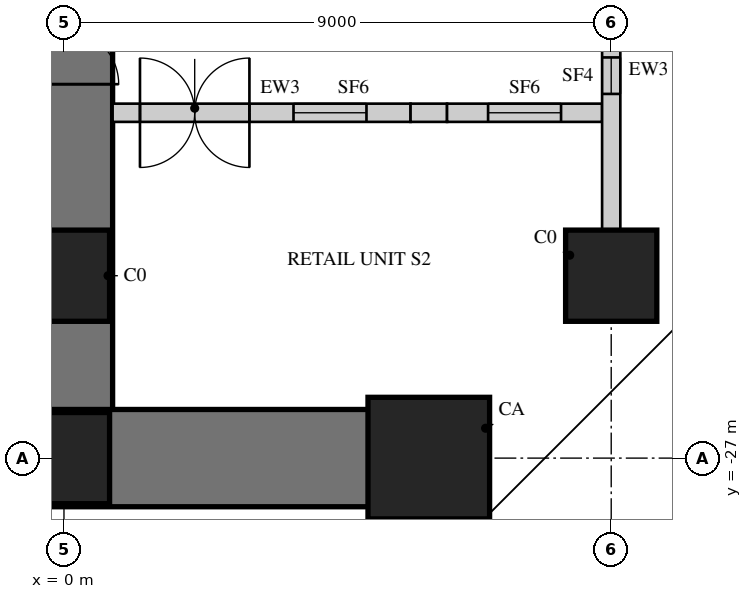
"""IFC4 building model, lengths in metres.
Left out: names, types, materials, properties, quantities, classifications, styles, units other than length and angle.
Written with IfcOpenShell. Run it as: python <this file> out.ifc"""

import sys

from ifc_helpers import new_model, si_unit, direction, frame, frame_2d, origin, origin_2d, place, context, subcontext, project, spatial, rectangle, hollow_rectangle, extrude, element, fill, save


model = new_model("IFC4")
c1 = context("Model", 3, precision=1e-05, world=origin(), true_north=direction((0.0, 1.0)))
c2 = subcontext(c1, "Body", "Model", "MODEL_VIEW")
j1 = project(units=[si_unit("LENGTHUNIT", "METRE"), si_unit("PLANEANGLEUNIT", "RADIAN")], contexts=[c1])
p1 = place(None, origin())
s1 = spatial("IfcSite", under=j1, at=p1, CompositionType="ELEMENT")
p2 = place(p1, origin())
s2 = spatial("IfcBuilding", under=s1, at=p2, CompositionType="ELEMENT")
p3 = place(p2, origin())
s3 = spatial("IfcBuildingStorey", under=s2, at=p3, CompositionType="ELEMENT", Elevation=0.0)
p4 = place(p3, frame((0.0, -9.0, 0.0), z_axis=(0.0, 0.0, 1.0), x_axis=(0.0, -1.0, 0.0)))
e1 = element("IfcWall", 1, at=p4, inside=s3, PredefinedType="SHEAR", context=c2, shape_type="SweptSolid", body=[
    extrude(rectangle(XDim=18.0, YDim=1.6, at=frame_2d((9.0, 0.0))), origin(), (0.0, 0.0, 1.0), 5.0),
])
p5 = place(p4, frame((10.05, 0.0, 0.0)))
e2 = element("IfcOpeningElement", 2, at=p5, cuts=e1, PredefinedType="OPENING", context=c2, shape_type="SweptSolid", body=[
    extrude(rectangle(XDim=1.8, YDim=2.4, at=frame_2d((0.9, 1.2))), frame((0.0, 0.81, 0.0), z_axis=(0.0, -1.0, 0.0), x_axis=(1.0, 0.0, 0.0)), (0.0, 0.0, 1.0), 1.62),
])
p6 = place(p3, frame((-6.0, -27.0, 0.0), z_axis=(0.0, 0.0, 1.0), x_axis=(1.0, 0.0, 0.0)))
e3 = element("IfcWall", 3, at=p6, inside=s3, PredefinedType="SHEAR", context=c2, shape_type="SweptSolid", body=[
    extrude(rectangle(XDim=12.0, YDim=1.6, at=frame_2d((6.0, 0.0))), origin(), (0.0, 0.0, 1.0), 5.0),
])
for number, where, z_axis, x_axis in (
    (4, (9.0, -24.0, 0.0), (0.0, 0.0, 1.0), (1.0, 0.0, 0.0)),
    (5, (0.0, -27.0, 0.0), (0.0, 0.0, 1.0), (1.0, 0.0, 0.0)),
):
    element("IfcColumn", number, at=place(p3, frame(where, z_axis=z_axis, x_axis=x_axis)), inside=s3, PredefinedType="COLUMN", context=c2, shape_type="SweptSolid", body=[
        extrude(rectangle(XDim=1.5, YDim=1.5, at=origin_2d()), origin(), (0.0, 0.0, 1.0), 5.0),
    ])
p7 = place(p3, frame((6.0, -27.0, 0.0), z_axis=(0.0, 0.0, 1.0), x_axis=(1.0, 0.0, 0.0)))
e6 = element("IfcColumn", 6, at=p7, inside=s3, PredefinedType="COLUMN", context=c2, shape_type="SweptSolid", body=[
    extrude(rectangle(XDim=2.0, YDim=2.0, at=origin_2d()), origin(), (0.0, 0.0, 1.0), 5.0),
])
p8 = place(p3, frame((0.0, -24.0, 0.0), z_axis=(0.0, 0.0, 1.0), x_axis=(1.0, 0.0, 0.0)))
e7 = element("IfcColumn", 7, at=p8, inside=s3, PredefinedType="COLUMN", context=c2, shape_type="SweptSolid", body=[
    extrude(rectangle(XDim=1.5, YDim=1.5, at=origin_2d()), origin(), (0.0, 0.0, 1.0), 5.0),
])
p9 = place(p3, frame((0.8, -21.32, 0.0), z_axis=(0.0, 0.0, 1.0), x_axis=(1.0, 0.0, 0.0)))
e8 = element("IfcWall", 8, at=p9, inside=s3, PredefinedType="SOLIDWALL", context=c2, shape_type="SweptSolid", body=[
    extrude(rectangle(XDim=4.9, YDim=0.3, at=frame_2d((2.45, 0.0))), origin(), (0.0, 0.0, 1.0), 3.85),
])
p10 = place(p9, frame((0.45, 0.0, 0.0)))
e9 = element("IfcOpeningElement", 9, at=p10, cuts=e8, PredefinedType="OPENING", context=c2, shape_type="SweptSolid", body=[
    extrude(rectangle(XDim=1.8, YDim=2.4, at=frame_2d((0.9, 1.2))), frame((0.0, 0.16, 0.0), z_axis=(0.0, -1.0, 0.0), x_axis=(1.0, 0.0, 0.0)), (0.0, 0.0, 1.0), 0.32),
])
p11 = place(p9, frame((2.975, 0.0, 0.3)))
e10 = element("IfcOpeningElement", 10, at=p11, cuts=e8, PredefinedType="OPENING", context=c2, shape_type="SweptSolid", body=[
    extrude(rectangle(XDim=1.2, YDim=3.4, at=frame_2d((0.6, 1.7))), frame((0.0, 0.16, 0.0), z_axis=(0.0, -1.0, 0.0), x_axis=(1.0, 0.0, 0.0)), (0.0, 0.0, 1.0), 0.32),
])
p12 = place(p3, frame((5.7, -21.32, 0.0), z_axis=(0.0, 0.0, 1.0), x_axis=(1.0, 0.0, 0.0)))
e11 = element("IfcWall", 11, at=p12, inside=s3, PredefinedType="SOLIDWALL", context=c2, shape_type="SweptSolid", body=[
    extrude(rectangle(XDim=0.6, YDim=0.3, at=frame_2d((0.3, 0.0))), origin(), (0.0, 0.0, 1.0), 4.8),
])
p13 = place(p3, frame((6.3, -21.32, 0.0), z_axis=(0.0, 0.0, 1.0), x_axis=(1.0, 0.0, 0.0)))
e12 = element("IfcWall", 12, at=p13, inside=s3, PredefinedType="SOLIDWALL", context=c2, shape_type="SweptSolid", body=[
    extrude(rectangle(XDim=2.55, YDim=0.3, at=frame_2d((1.275, 0.0))), origin(), (0.0, 0.0, 1.0), 3.85),
])
p14 = place(p13, frame((0.675, 0.0, 0.3)))
e13 = element("IfcOpeningElement", 13, at=p14, cuts=e12, PredefinedType="OPENING", context=c2, shape_type="SweptSolid", body=[
    extrude(rectangle(XDim=1.2, YDim=3.4, at=frame_2d((0.6, 1.7))), frame((0.0, 0.16, 0.0), z_axis=(0.0, -1.0, 0.0), x_axis=(1.0, 0.0, 0.0)), (0.0, 0.0, 1.0), 0.32),
])
p15 = place(p3, frame((9.0, -15.75, 0.0), z_axis=(0.0, 0.0, 1.0), x_axis=(0.0, -1.0, 0.0)))
e14 = element("IfcWall", 14, at=p15, inside=s3, PredefinedType="SOLIDWALL", context=c2, shape_type="SweptSolid", body=[
    extrude(rectangle(XDim=7.5, YDim=0.3, at=frame_2d((3.75, 0.0))), origin(), (0.0, 0.0, 1.0), 3.8),
])
p16 = place(p15, frame((2.7, 0.0, 0.0)))
e15 = element("IfcOpeningElement", 15, at=p16, cuts=e14, PredefinedType="OPENING", context=c2, shape_type="SweptSolid", body=[
    extrude(rectangle(XDim=1.8, YDim=2.4, at=frame_2d((0.9, 1.2))), frame((0.0, 0.16, 0.0), z_axis=(0.0, -1.0, 0.0), x_axis=(1.0, 0.0, 0.0)), (0.0, 0.0, 1.0), 0.32),
])
p17 = place(p15, frame((1.212, 0.0, 0.3)))
e16 = element("IfcOpeningElement", 16, at=p17, cuts=e14, PredefinedType="OPENING", context=c2, shape_type="SweptSolid", body=[
    extrude(rectangle(XDim=0.6, YDim=3.4, at=frame_2d((0.3, 1.7))), frame((0.0, 0.16, 0.0), z_axis=(0.0, -1.0, 0.0), x_axis=(1.0, 0.0, 0.0)), (0.0, 0.0, 1.0), 0.32),
])
p18 = place(p15, frame((4.66, 0.0, 0.3)))
e17 = element("IfcOpeningElement", 17, at=p18, cuts=e14, PredefinedType="OPENING", context=c2, shape_type="SweptSolid", body=[
    extrude(rectangle(XDim=0.6, YDim=3.4, at=frame_2d((0.3, 1.7))), frame((0.0, 0.16, 0.0), z_axis=(0.0, -1.0, 0.0), x_axis=(1.0, 0.0, 0.0)), (0.0, 0.0, 1.0), 0.32),
])
p19 = place(p15, frame((2.7, 0.0, 2.6)))
e18 = element("IfcOpeningElement", 18, at=p19, cuts=e14, PredefinedType="OPENING", context=c2, shape_type="SweptSolid", body=[
    extrude(rectangle(XDim=1.8, YDim=1.1, at=frame_2d((0.9, 0.55))), frame((0.0, 0.16, 0.0), z_axis=(0.0, -1.0, 0.0), x_axis=(1.0, 0.0, 0.0)), (0.0, 0.0, 1.0), 0.32),
])
p20 = place(p10, origin())
e19 = element("IfcDoor", 19, at=p20, inside=s3, OperationType="DOUBLE_DOOR_DOUBLE_SWING", PredefinedType="DOOR", context=c2, shape_type="SweptSolid", body=[
    extrude(hollow_rectangle(XDim=1.8, YDim=2.4, WallThickness=0.06, at=frame_2d((0.9, 1.2))), frame((0.0, 0.025, 0.0), z_axis=(0.0, -1.0, 0.0), x_axis=(1.0, 0.0, 0.0)), (0.0, 0.0, 1.0), 0.05),
    extrude(rectangle(XDim=1.679, YDim=2.279, at=frame_2d((0.9, 1.2))), frame((0.0, 0.025, 0.0), z_axis=(0.0, -1.0, 0.0), x_axis=(1.0, 0.0, 0.0)), (0.0, 0.0, 1.0), 0.05),
])
fill(e9, e19)
p21 = place(p11, origin())
e20 = element("IfcWindow", 20, at=p21, inside=s3, PartitioningType="SINGLE_PANEL", PredefinedType="WINDOW", context=c2, shape_type="SweptSolid", body=[
    extrude(hollow_rectangle(XDim=1.2, YDim=3.4, WallThickness=0.06, at=frame_2d((0.6, 1.7))), frame((0.0, 0.03, 0.0), z_axis=(0.0, -1.0, 0.0), x_axis=(1.0, 0.0, 0.0)), (0.0, 0.0, 1.0), 0.06),
    extrude(rectangle(XDim=1.079, YDim=3.279, at=frame_2d((0.6, 1.7))), frame((0.0, 0.03, 0.0), z_axis=(0.0, -1.0, 0.0), x_axis=(1.0, 0.0, 0.0)), (0.0, 0.0, 1.0), 0.06),
])
fill(e10, e20)
p22 = place(p14, origin())
e21 = element("IfcWindow", 21, at=p22, inside=s3, PartitioningType="SINGLE_PANEL", PredefinedType="WINDOW", context=c2, shape_type="SweptSolid", body=[
    extrude(hollow_rectangle(XDim=1.2, YDim=3.4, WallThickness=0.06, at=frame_2d((0.6, 1.7))), frame((0.0, 0.03, 0.0), z_axis=(0.0, -1.0, 0.0), x_axis=(1.0, 0.0, 0.0)), (0.0, 0.0, 1.0), 0.06),
    extrude(rectangle(XDim=1.079, YDim=3.279, at=frame_2d((0.6, 1.7))), frame((0.0, 0.03, 0.0), z_axis=(0.0, -1.0, 0.0), x_axis=(1.0, 0.0, 0.0)), (0.0, 0.0, 1.0), 0.06),
])
fill(e13, e21)
p23 = place(p18, origin())
e22 = element("IfcWindow", 22, at=p23, inside=s3, PartitioningType="SINGLE_PANEL", PredefinedType="WINDOW", context=c2, shape_type="SweptSolid", body=[
    extrude(hollow_rectangle(XDim=0.6, YDim=3.4, WallThickness=0.06, at=frame_2d((0.3, 1.7))), frame((0.0, 0.03, 0.0), z_axis=(0.0, -1.0, 0.0), x_axis=(1.0, 0.0, 0.0)), (0.0, 0.0, 1.0), 0.06),
    extrude(rectangle(XDim=0.479, YDim=3.279, at=frame_2d((0.3, 1.7))), frame((0.0, 0.03, 0.0), z_axis=(0.0, -1.0, 0.0), x_axis=(1.0, 0.0, 0.0)), (0.0, 0.0, 1.0), 0.06),
])
fill(e17, e22)
p24 = place(p5, origin())
e23 = element("IfcDoor", 23, at=p24, inside=s3, OperationType="DOUBLE_DOOR_DOUBLE_SWING", PredefinedType="DOOR", context=c2, shape_type="SweptSolid", body=[
    extrude(hollow_rectangle(XDim=1.8, YDim=2.4, WallThickness=0.06, at=frame_2d((0.9, 1.2))), frame((0.0, 0.025, 0.0), z_axis=(0.0, -1.0, 0.0), x_axis=(1.0, 0.0, 0.0)), (0.0, 0.0, 1.0), 0.05),
    extrude(rectangle(XDim=1.679, YDim=2.279, at=frame_2d((0.9, 1.2))), frame((0.0, 0.025, 0.0), z_axis=(0.0, -1.0, 0.0), x_axis=(1.0, 0.0, 0.0)), (0.0, 0.0, 1.0), 0.05),
])
fill(e2, e23)
save(model, sys.argv[1])
